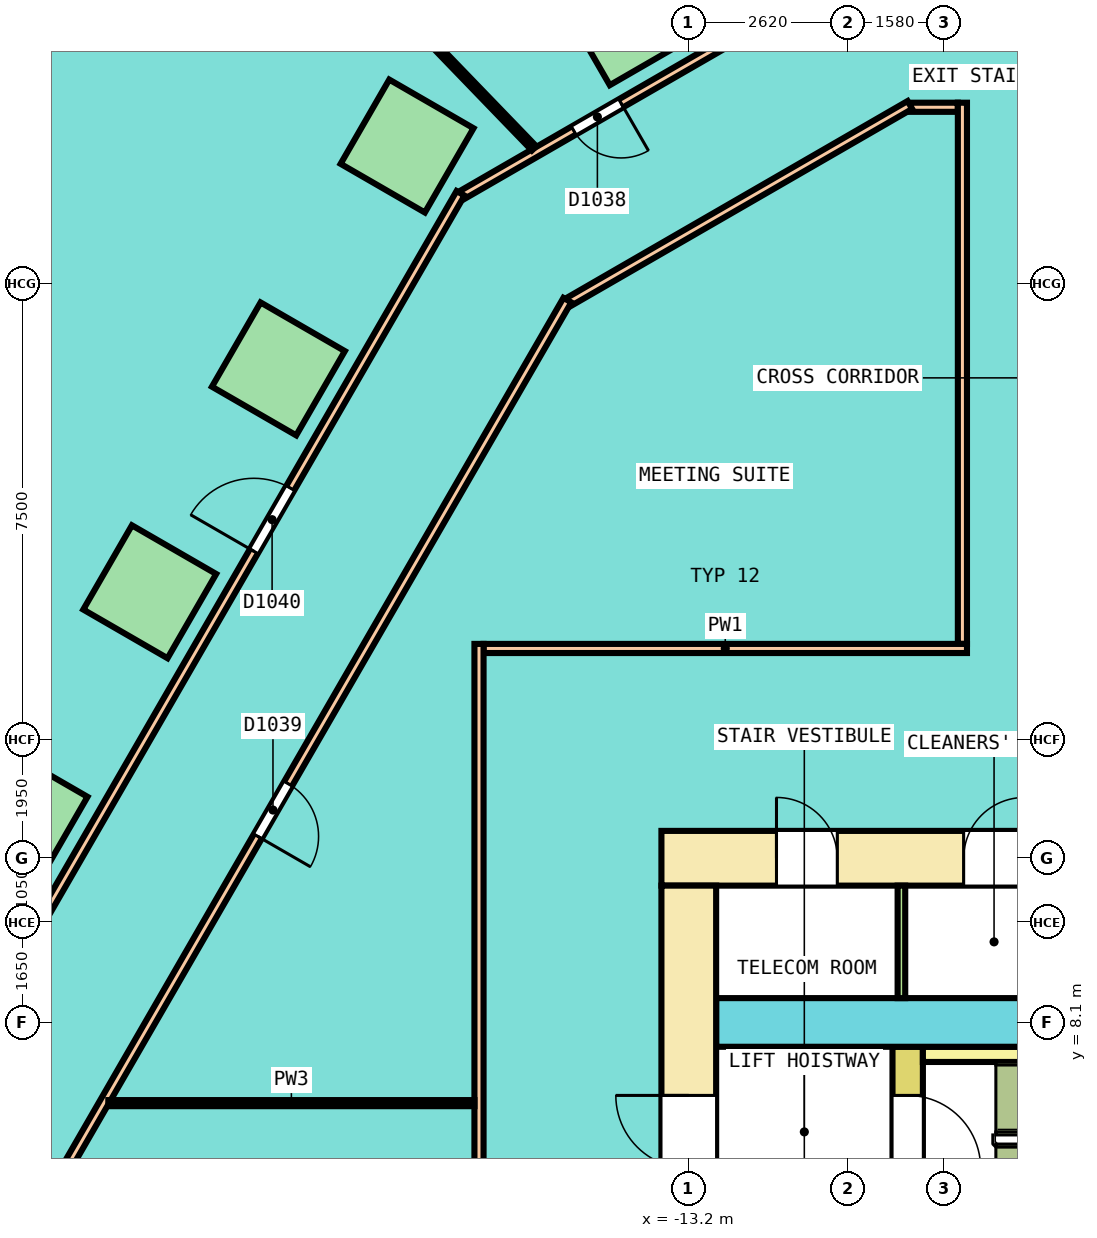
"""IFC4 building model, lengths in metres.
Left out: names, types, materials, properties, quantities, classifications, styles, units other than length and angle.
Written with IfcOpenShell. Run it as: python <this file> out.ifc"""

import sys

from ifc_helpers import new_model, si_unit, direction, frame, frame_2d, origin, origin_2d, place, context, subcontext, project, spatial, rectangle, extrude, element, fill, save


model = new_model("IFC4")
c1 = context("Model", 3, precision=1e-05, world=origin(), true_north=direction((0.0, 1.0)))
c2 = subcontext(c1, "Body", "Model", "MODEL_VIEW")
j1 = project(units=[si_unit("LENGTHUNIT", "METRE"), si_unit("PLANEANGLEUNIT", "RADIAN")], contexts=[c1])
p1 = place(None, origin())
s1 = spatial("IfcSite", under=j1, at=p1, CompositionType="ELEMENT")
p2 = place(p1, origin())
s2 = spatial("IfcBuilding", under=s1, at=p2, CompositionType="ELEMENT")
p3 = place(p2, frame((0.0, 0.0, 5.6)))
s3 = spatial("IfcBuildingStorey", under=s2, at=p3, CompositionType="ELEMENT", Elevation=5.6)
for number, where, z_axis, x_axis in (
    (1, (-14.206, 24.606, 0.0), (0.0, 0.0, 1.0), (-0.866, -0.5, 0.0)),
    (2, (-17.833, 22.512, 0.0), (0.0, 0.0, 1.0), (-0.5, -0.866, 0.0)),
    (3, (-19.949, 18.847, 0.0), (0.0, 0.0, 1.0), (-0.5, -0.866, 0.0)),
    (4, (-22.065, 15.183, 0.0), (0.0, 0.0, 1.0), (-0.5, -0.866, 0.0)),
    (5, (-24.181, 11.518, 0.0), (0.0, 0.0, 1.0), (-0.5, -0.866, 0.0)),
):
    element("IfcColumn", number, at=place(p3, frame(where, z_axis=z_axis, x_axis=x_axis)), inside=s3, PredefinedType="COLUMN", context=c2, shape_type="SweptSolid", body=[
        extrude(rectangle(XDim=1.6, YDim=1.6, at=origin_2d()), origin(), (0.0, 0.0, 1.0), 4.25),
    ])
p4 = place(p3, frame((-13.65, 10.8, 0.0), z_axis=(0.0, 0.0, 1.0), x_axis=(1.0, 0.0, 0.0)))
e6 = element("IfcWall", 6, at=p4, inside=s3, PredefinedType="SHEAR", context=c2, shape_type="SweptSolid", body=[
    extrude(rectangle(XDim=27.3, YDim=0.9, at=frame_2d((13.65, 0.0))), origin(), (0.0, 0.0, 1.0), 4.3),
])
p5 = place(p4, frame((1.892, 0.0, 0.0)))
e7 = element("IfcOpeningElement", 7, at=p5, cuts=e6, PredefinedType="OPENING", context=c2, shape_type="SweptSolid", body=[
    extrude(rectangle(XDim=1.0, YDim=2.1, at=frame_2d((0.5, 1.05))), frame((0.0, 0.46, 0.0), z_axis=(0.0, -1.0, 0.0), x_axis=(1.0, 0.0, 0.0)), (0.0, 0.0, 1.0), 0.92),
])
p6 = place(p4, frame((4.97, 0.0, 0.0)))
e8 = element("IfcOpeningElement", 8, at=p6, cuts=e6, PredefinedType="OPENING", context=c2, shape_type="SweptSolid", body=[
    extrude(rectangle(XDim=1.0, YDim=2.1, at=frame_2d((0.5, 1.05))), frame((0.0, 0.46, 0.0), z_axis=(0.0, -1.0, 0.0), x_axis=(1.0, 0.0, 0.0)), (0.0, 0.0, 1.0), 0.92),
])
p7 = place(p4, frame((8.017, 0.0, 0.0)))
e9 = element("IfcOpeningElement", 9, at=p7, cuts=e6, PredefinedType="OPENING", context=c2, shape_type="SweptSolid", body=[
    extrude(rectangle(XDim=1.0, YDim=2.1, at=frame_2d((0.5, 1.05))), frame((0.0, 0.46, 0.0), z_axis=(0.0, -1.0, 0.0), x_axis=(1.0, 0.0, 0.0)), (0.0, 0.0, 1.0), 0.92),
])
p8 = place(p4, frame((11.064, 0.0, 0.0)))
e10 = element("IfcOpeningElement", 10, at=p8, cuts=e6, PredefinedType="OPENING", context=c2, shape_type="SweptSolid", body=[
    extrude(rectangle(XDim=1.0, YDim=2.1, at=frame_2d((0.5, 1.05))), frame((0.0, 0.46, 0.0), z_axis=(0.0, -1.0, 0.0), x_axis=(1.0, 0.0, 0.0)), (0.0, 0.0, 1.0), 0.92),
])
p9 = place(p4, frame((21.238, 0.0, 0.0)))
e11 = element("IfcOpeningElement", 11, at=p9, cuts=e6, PredefinedType="OPENING", context=c2, shape_type="SweptSolid", body=[
    extrude(rectangle(XDim=1.0, YDim=2.1, at=frame_2d((0.5, 1.05))), frame((0.0, 0.46, 0.0), z_axis=(0.0, -1.0, 0.0), x_axis=(1.0, 0.0, 0.0)), (0.0, 0.0, 1.0), 0.92),
])
p10 = place(p4, frame((14.575, 0.0, 0.0)))
e12 = element("IfcOpeningElement", 12, at=p10, cuts=e6, PredefinedType="OPENING", context=c2, shape_type="SweptSolid", body=[
    extrude(rectangle(XDim=1.4, YDim=2.1, at=frame_2d((0.7, 1.05))), frame((0.0, 0.46, 0.0), z_axis=(0.0, -1.0, 0.0), x_axis=(1.0, 0.0, 0.0)), (0.0, 0.0, 1.0), 0.92),
])
p11 = place(p3, frame((-13.2, -10.35, 0.0), z_axis=(0.0, 0.0, 1.0), x_axis=(0.0, 1.0, 0.0)))
e13 = element("IfcWall", 13, at=p11, inside=s3, PredefinedType="SHEAR", context=c2, shape_type="SweptSolid", body=[
    extrude(rectangle(XDim=20.7, YDim=0.9, at=frame_2d((10.35, 0.0))), origin(), (0.0, 0.0, 1.0), 4.3),
])
p12 = place(p11, frame((9.15, 0.0, 0.0)))
e14 = element("IfcOpeningElement", 14, at=p12, cuts=e13, PredefinedType="OPENING", context=c2, shape_type="SweptSolid", body=[
    extrude(rectangle(XDim=2.4, YDim=2.1, at=frame_2d((1.2, 1.05))), frame((0.0, 0.46, 0.0), z_axis=(0.0, -1.0, 0.0), x_axis=(1.0, 0.0, 0.0)), (0.0, 0.0, 1.0), 0.92),
])
p13 = place(p11, frame((16.05, 0.0, 0.0)))
e15 = element("IfcOpeningElement", 15, at=p13, cuts=e13, PredefinedType="OPENING", context=c2, shape_type="SweptSolid", body=[
    extrude(rectangle(XDim=1.2, YDim=2.1, at=frame_2d((0.6, 1.05))), frame((0.0, 0.46, 0.0), z_axis=(0.0, -1.0, 0.0), x_axis=(1.0, 0.0, 0.0)), (0.0, 0.0, 1.0), 0.92),
])
p14 = place(p11, frame((3.45, 0.0, 0.0)))
e16 = element("IfcOpeningElement", 16, at=p14, cuts=e13, PredefinedType="OPENING", context=c2, shape_type="SweptSolid", body=[
    extrude(rectangle(XDim=1.2, YDim=2.1, at=frame_2d((0.6, 1.05))), frame((0.0, 0.46, 0.0), z_axis=(0.0, -1.0, 0.0), x_axis=(1.0, 0.0, 0.0)), (0.0, 0.0, 1.0), 0.92),
])
p15 = place(p3, frame((-12.75, 8.1, 0.0), z_axis=(0.0, 0.0, 1.0), x_axis=(1.0, 0.0, 0.0)))
e17 = element("IfcWall", 17, at=p15, inside=s3, PredefinedType="SHEAR", context=c2, shape_type="SweptSolid", body=[
    extrude(rectangle(XDim=25.5, YDim=0.8, at=frame_2d((12.75, 0.0))), origin(), (0.0, 0.0, 1.0), 4.3),
])
p16 = place(p15, frame((13.675, 0.0, 0.0)))
e18 = element("IfcOpeningElement", 18, at=p16, cuts=e17, PredefinedType="OPENING", context=c2, shape_type="SweptSolid", body=[
    extrude(rectangle(XDim=1.4, YDim=2.1, at=frame_2d((0.7, 1.05))), frame((0.0, 0.41, 0.0), z_axis=(0.0, -1.0, 0.0), x_axis=(1.0, 0.0, 0.0)), (0.0, 0.0, 1.0), 0.82),
])
p17 = place(p3, frame((-9.6, -7.7, 0.0), z_axis=(0.0, 0.0, 1.0), x_axis=(0.0, 1.0, 0.0)))
e19 = element("IfcWall", 19, at=p17, inside=s3, PredefinedType="SHEAR", context=c2, shape_type="SweptSolid", body=[
    extrude(rectangle(XDim=15.4, YDim=0.5, at=frame_2d((7.7, 0.0))), origin(), (0.0, 0.0, 1.0), 4.3),
])
p18 = place(p17, frame((6.5, 0.0, 0.0)))
e20 = element("IfcOpeningElement", 20, at=p18, cuts=e19, PredefinedType="OPENING", context=c2, shape_type="SweptSolid", body=[
    extrude(rectangle(XDim=2.4, YDim=2.1, at=frame_2d((1.2, 1.05))), frame((0.0, 0.26, 0.0), z_axis=(0.0, -1.0, 0.0), x_axis=(1.0, 0.0, 0.0)), (0.0, 0.0, 1.0), 0.52),
])
p19 = place(p17, frame((13.4, 0.0, 0.0)))
e21 = element("IfcOpeningElement", 21, at=p19, cuts=e19, PredefinedType="OPENING", context=c2, shape_type="SweptSolid", body=[
    extrude(rectangle(XDim=1.2, YDim=2.1, at=frame_2d((0.6, 1.05))), frame((0.0, 0.26, 0.0), z_axis=(0.0, -1.0, 0.0), x_axis=(1.0, 0.0, 0.0)), (0.0, 0.0, 1.0), 0.52),
])
p20 = place(p17, frame((0.8, 0.0, 0.0)))
e22 = element("IfcOpeningElement", 22, at=p20, cuts=e19, PredefinedType="OPENING", context=c2, shape_type="SweptSolid", body=[
    extrude(rectangle(XDim=1.2, YDim=2.1, at=frame_2d((0.6, 1.05))), frame((0.0, 0.26, 0.0), z_axis=(0.0, -1.0, 0.0), x_axis=(1.0, 0.0, 0.0)), (0.0, 0.0, 1.0), 0.52),
])
p21 = place(p3, frame((-9.35, 7.575, 0.0), z_axis=(0.0, 0.0, 1.0), x_axis=(1.0, 0.0, 0.0)))
e23 = element("IfcWall", 23, at=p21, inside=s3, PredefinedType="SOLIDWALL", context=c2, shape_type="SweptSolid", body=[
    extrude(rectangle(XDim=5.8, YDim=0.25, at=frame_2d((2.9, 0.0))), origin(), (0.0, 0.0, 1.0), 4.3),
])
p22 = place(p3, frame((-9.703, 8.5, 0.0), z_axis=(0.0, 0.0, 1.0), x_axis=(0.0, 1.0, 0.0)))
e24 = element("IfcWall", 24, at=p22, inside=s3, PredefinedType="PARTITIONING", context=c2, shape_type="SweptSolid", body=[
    extrude(rectangle(XDim=1.85, YDim=0.125, at=frame_2d((0.925, 0.0))), origin(), (0.0, 0.0, 1.0), 4.3),
])
p23 = place(p3, frame((-9.554, 23.15, 0.0), z_axis=(0.0, 0.0, 1.0), x_axis=(1.0, 0.0, 0.0)))
e25 = element("IfcWall", 25, at=p23, inside=s3, PredefinedType="PARTITIONING", context=c2, shape_type="SweptSolid", body=[
    extrude(rectangle(XDim=0.779, YDim=0.15, at=frame_2d((0.389, 0.0))), origin(), (0.0, 0.0, 1.0), 3.2),
])
p24 = place(p3, frame((-16.926, 21.708, 0.0), z_axis=(0.0, 0.0, 1.0), x_axis=(0.866023143435, 0.50000391502, 0.0)))
e26 = element("IfcWall", 26, at=p24, inside=s3, PredefinedType="PARTITIONING", context=c2, shape_type="SweptSolid", body=[
    extrude(rectangle(XDim=7.759, YDim=0.15, at=frame_2d((3.879, 0.0))), origin(), (0.0, 0.0, 1.0), 3.2),
])
p25 = place(p24, frame((2.117, 0.0, 0.0)))
e27 = element("IfcOpeningElement", 27, at=p25, cuts=e26, PredefinedType="OPENING", context=c2, shape_type="SweptSolid", body=[
    extrude(rectangle(XDim=0.9, YDim=2.1, at=frame_2d((0.45, 1.05))), frame((0.0, 0.085, 0.0), z_axis=(0.0, -1.0, 0.0), x_axis=(1.0, 0.0, 0.0)), (0.0, 0.0, 1.0), 0.17),
])
p26 = place(p3, frame((-15.169, 19.951, 0.0), z_axis=(0.0, 0.0, 1.0), x_axis=(0.866024786089, 0.500001069878, 0.0)))
e28 = element("IfcWall", 28, at=p26, inside=s3, PredefinedType="PARTITIONING", context=c2, shape_type="SweptSolid", body=[
    extrude(rectangle(XDim=6.473, YDim=0.15, at=frame_2d((3.236, 0.0))), origin(), (0.0, 0.0, 1.0), 3.2),
])
p27 = place(p3, frame((-24.825, 3.301, 0.0), z_axis=(0.0, 0.0, 1.0), x_axis=(0.499992422807, 0.866029778435, 0.0)))
e29 = element("IfcWall", 29, at=p27, inside=s3, PredefinedType="PARTITIONING", context=c2, shape_type="SweptSolid", body=[
    extrude(rectangle(XDim=19.257, YDim=0.15, at=frame_2d((9.628, 0.0))), origin(), (0.0, 0.0, 1.0), 3.2),
])
p28 = place(p27, frame((9.074, 0.0, 0.0)))
e30 = element("IfcOpeningElement", 30, at=p28, cuts=e29, PredefinedType="OPENING", context=c2, shape_type="SweptSolid", body=[
    extrude(rectangle(XDim=1.0, YDim=2.1, at=frame_2d((0.5, 1.05))), frame((0.0, 0.085, 0.0), z_axis=(0.0, -1.0, 0.0), x_axis=(1.0, 0.0, 0.0)), (0.0, 0.0, 1.0), 0.17),
])
p29 = place(p3, frame((-27.225, 3.944, 0.0), z_axis=(0.0, 0.0, 1.0), x_axis=(0.499997805905, 0.866026670542, 0.0)))
e31 = element("IfcWall", 31, at=p29, inside=s3, PredefinedType="PARTITIONING", context=c2, shape_type="SweptSolid", body=[
    extrude(rectangle(XDim=20.543, YDim=0.15, at=frame_2d((10.272, 0.0))), origin(), (0.0, 0.0, 1.0), 3.2),
])
p30 = place(p29, frame((13.746, 0.0, 0.0)))
e32 = element("IfcOpeningElement", 32, at=p30, cuts=e31, PredefinedType="OPENING", context=c2, shape_type="SweptSolid", body=[
    extrude(rectangle(XDim=1.2, YDim=2.1, at=frame_2d((0.6, 1.05))), frame((0.0, 0.085, 0.0), z_axis=(0.0, -1.0, 0.0), x_axis=(1.0, 0.0, 0.0)), (0.0, 0.0, 1.0), 0.17),
])
p31 = place(p3, frame((-8.7, 14.325, 0.0), z_axis=(0.0, 0.0, 1.0), x_axis=(0.0, 1.0, 0.0)))
e33 = element("IfcWall", 33, at=p31, inside=s3, PredefinedType="PARTITIONING", context=c2, shape_type="SweptSolid", body=[
    extrude(rectangle(XDim=8.9, YDim=0.15, at=frame_2d((4.45, 0.0))), origin(), (0.0, 0.0, 1.0), 3.2),
])
p32 = place(p3, frame((-16.575, 14.25, 0.0), z_axis=(0.0, 0.0, 1.0), x_axis=(1.0, 0.0, 0.0)))
e34 = element("IfcWall", 34, at=p32, inside=s3, PredefinedType="PARTITIONING", context=c2, shape_type="SweptSolid", body=[
    extrude(rectangle(XDim=7.95, YDim=0.15, at=frame_2d((3.975, 0.0))), origin(), (0.0, 0.0, 1.0), 3.2),
])
p33 = place(p3, frame((-16.65, -4.875, 0.0), z_axis=(0.0, 0.0, 1.0), x_axis=(0.0, 1.0, 0.0)))
e35 = element("IfcWall", 35, at=p33, inside=s3, PredefinedType="PARTITIONING", context=c2, shape_type="SweptSolid", body=[
    extrude(rectangle(XDim=19.2, YDim=0.15, at=frame_2d((9.6, 0.0))), origin(), (0.0, 0.0, 1.0), 3.2),
])
p34 = place(p33, frame((2.843, 0.0, 0.0)))
e36 = element("IfcOpeningElement", 36, at=p34, cuts=e35, PredefinedType="OPENING", context=c2, shape_type="SweptSolid", body=[
    extrude(rectangle(XDim=1.2, YDim=2.1, at=frame_2d((0.6, 1.05))), frame((0.0, 0.085, 0.0), z_axis=(0.0, -1.0, 0.0), x_axis=(1.0, 0.0, 0.0)), (0.0, 0.0, 1.0), 0.17),
])
p35 = place(p3, frame((-23.64, 30.654, 0.0), z_axis=(0.0, 0.0, 1.0), x_axis=(0.694530893364, -0.719462881713, 0.0)))
e37 = element("IfcWall", 37, at=p35, inside=s3, PredefinedType="PARTITIONING", context=c2, shape_type="SweptSolid", body=[
    extrude(rectangle(XDim=11.369, YDim=0.1, at=frame_2d((5.685, 0.0))), origin(), (0.0, 0.0, 1.0), 3.35),
])
p36 = place(p3, frame((-22.746, 6.773, 0.0), z_axis=(0.0, 0.0, 1.0), x_axis=(1.0, 0.0, 0.0)))
e38 = element("IfcWall", 38, at=p36, inside=s3, PredefinedType="PARTITIONING", context=c2, shape_type="SweptSolid", body=[
    extrude(rectangle(XDim=6.021, YDim=0.1, at=frame_2d((3.01, 0.0))), origin(), (0.0, 0.0, 1.0), 3.2),
])
p37 = place(p19, origin())
e39 = element("IfcDoor", 39, at=p37, inside=s3, OperationType="SINGLE_SWING_LEFT", PredefinedType="DOOR", context=c2, shape_type="SweptSolid", body=[
    extrude(rectangle(XDim=1.2, YDim=2.1, at=frame_2d((0.6, 1.05))), frame((0.0, 0.2, 0.0), z_axis=(0.0, -1.0, 0.0), x_axis=(1.0, 0.0, 0.0)), (0.0, 0.0, 1.0), 0.4),
])
fill(e21, e39)
p38 = place(p13, origin())
e40 = element("IfcDoor", 40, at=p38, inside=s3, OperationType="SINGLE_SWING_RIGHT", PredefinedType="DOOR", context=c2, shape_type="SweptSolid", body=[
    extrude(rectangle(XDim=1.2, YDim=2.1, at=frame_2d((0.6, 1.05))), frame((0.0, 0.3, 0.0), z_axis=(0.0, -1.0, 0.0), x_axis=(1.0, 0.0, 0.0)), (0.0, 0.0, 1.0), 0.6),
])
fill(e15, e40)
p39 = place(p5, origin())
e41 = element("IfcDoor", 41, at=p39, inside=s3, OperationType="SINGLE_SWING_RIGHT", PredefinedType="DOOR", context=c2, shape_type="SweptSolid", body=[
    extrude(rectangle(XDim=1.0, YDim=2.1, at=frame_2d((0.5, 1.05))), frame((0.0, 0.3, 0.0), z_axis=(0.0, -1.0, 0.0), x_axis=(1.0, 0.0, 0.0)), (0.0, 0.0, 1.0), 0.6),
])
fill(e7, e41)
p40 = place(p6, origin())
e42 = element("IfcDoor", 42, at=p40, inside=s3, OperationType="SINGLE_SWING_LEFT", PredefinedType="DOOR", context=c2, shape_type="SweptSolid", body=[
    extrude(rectangle(XDim=1.0, YDim=2.1, at=frame_2d((0.5, 1.05))), frame((0.0, 0.3, 0.0), z_axis=(0.0, -1.0, 0.0), x_axis=(1.0, 0.0, 0.0)), (0.0, 0.0, 1.0), 0.6),
])
fill(e8, e42)
p41 = place(p25, origin())
e43 = element("IfcDoor", 43, at=p41, inside=s3, OperationType="SINGLE_SWING_RIGHT", PredefinedType="DOOR", context=c2, shape_type="SweptSolid", body=[
    extrude(rectangle(XDim=0.9, YDim=2.1, at=frame_2d((0.45, 1.05))), frame((0.0, 0.025, 0.0), z_axis=(0.0, -1.0, 0.0), x_axis=(1.0, 0.0, 0.0)), (0.0, 0.0, 1.0), 0.05),
])
fill(e27, e43)
p42 = place(p28, origin())
e44 = element("IfcDoor", 44, at=p42, inside=s3, OperationType="SINGLE_SWING_RIGHT", PredefinedType="DOOR", context=c2, shape_type="SweptSolid", body=[
    extrude(rectangle(XDim=1.0, YDim=2.1, at=frame_2d((0.5, 1.05))), frame((0.0, 0.025, 0.0), z_axis=(0.0, -1.0, 0.0), x_axis=(1.0, 0.0, 0.0)), (0.0, 0.0, 1.0), 0.05),
])
fill(e30, e44)
p43 = place(p30, origin())
e45 = element("IfcDoor", 45, at=p43, inside=s3, OperationType="DOUBLE_DOOR_SINGLE_SWING", PredefinedType="DOOR", context=c2, shape_type="SweptSolid", body=[
    extrude(rectangle(XDim=1.2, YDim=2.1, at=frame_2d((0.6, 1.05))), frame((0.0, 0.025, 0.0), z_axis=(0.0, -1.0, 0.0), x_axis=(1.0, 0.0, 0.0)), (0.0, 0.0, 1.0), 0.05),
])
fill(e32, e45)
save(model, sys.argv[1])
